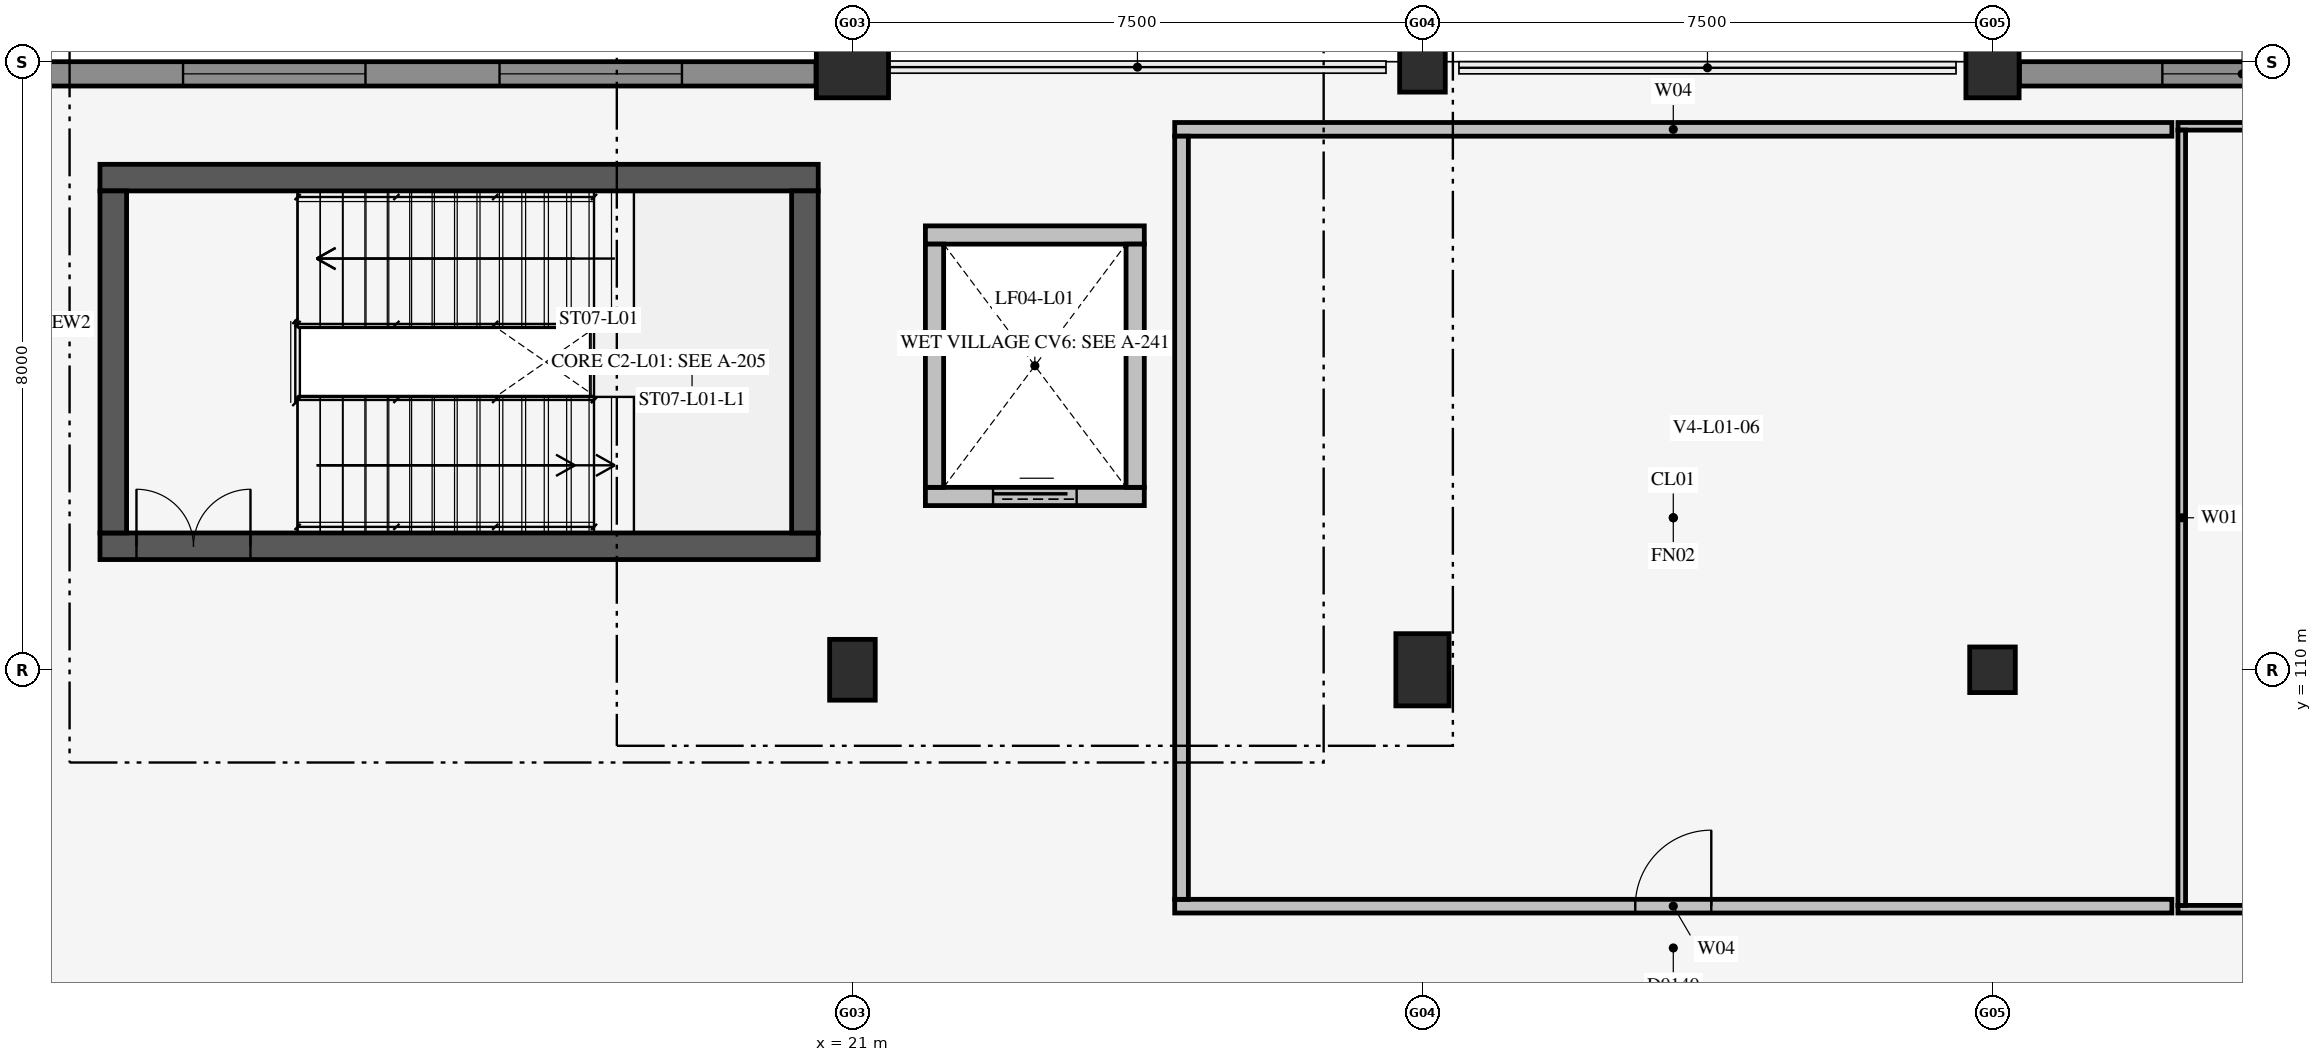
"""IFC4 building model, lengths in metres.
Left out: names, types, materials, properties, quantities, classifications, styles, units other than length and angle.
Written with IfcOpenShell. Run it as: python <this file> out.ifc"""

import sys

from ifc_helpers import new_model, si_unit, direction, frame, frame_2d, origin, origin_2d, place, context, subcontext, project, spatial, rectangle, circle, extrude, element, fill, save


model = new_model("IFC4")
c1 = context("Model", 3, precision=1e-05, world=origin(), true_north=direction((0.0, 1.0)))
c2 = subcontext(c1, "Body", "Model", "MODEL_VIEW")
j1 = project(units=[si_unit("LENGTHUNIT", "METRE"), si_unit("PLANEANGLEUNIT", "RADIAN")], contexts=[c1])
p1 = place(None, origin())
s1 = spatial("IfcSite", under=j1, at=p1, CompositionType="ELEMENT")
p2 = place(p1, origin())
s2 = spatial("IfcBuilding", under=s1, at=p2, CompositionType="ELEMENT")
p3 = place(p2, frame((0.0, 0.0, 5.4)))
s3 = spatial("IfcBuildingStorey", under=s2, at=p3, CompositionType="ELEMENT", Elevation=5.4)
p4 = place(p3, frame((11.1, 111.625, 0.0), z_axis=(0.0, 0.0, 1.0), x_axis=(1.0, 0.0, 0.0)))
e1 = element("IfcWall", 1, at=p4, inside=s3, PredefinedType="SHEAR", context=c2, shape_type="SweptSolid", body=[
    extrude(rectangle(XDim=9.45, YDim=0.35, at=frame_2d((4.725, 0.0))), origin(), (0.0, 0.0, 1.0), 4.58),
])
p5 = place(p4, frame((0.48, 0.0, 0.0)))
e2 = element("IfcOpeningElement", 2, at=p5, cuts=e1, PredefinedType="OPENING", context=c2, shape_type="SweptSolid", body=[
    extrude(rectangle(XDim=1.5, YDim=2.3, at=frame_2d((0.75, 1.15))), frame((0.0, 0.187, 0.0), z_axis=(0.0, -1.0, 0.0), x_axis=(1.0, 0.0, 0.0)), (0.0, 0.0, 1.0), 0.374),
])
p6 = place(p3, frame((11.1, 116.475, 0.0), z_axis=(0.0, 0.0, 1.0), x_axis=(1.0, 0.0, 0.0)))
e3 = element("IfcWall", 3, at=p6, inside=s3, PredefinedType="SHEAR", context=c2, shape_type="SweptSolid", body=[
    extrude(rectangle(XDim=9.45, YDim=0.35, at=frame_2d((4.725, 0.0))), origin(), (0.0, 0.0, 1.0), 4.58),
])
for number, where, z_axis, x_axis in (
    (4, (11.275, 111.8, 0.0), (0.0, 0.0, 1.0), (0.0, 1.0, 0.0)),
    (5, (20.375, 111.8, 0.0), (0.0, 0.0, 1.0), (0.0, 1.0, 0.0)),
):
    element("IfcWall", number, at=place(p3, frame(where, z_axis=z_axis, x_axis=x_axis)), inside=s3, PredefinedType="SHEAR", context=c2, shape_type="SweptSolid", body=[
        extrude(rectangle(XDim=4.5, YDim=0.35, at=frame_2d((2.25, 0.0))), origin(), (0.0, 0.0, 1.0), 4.58),
    ])
p7 = place(p3, frame((21.96, 112.28, 0.0), z_axis=(0.0, 0.0, 1.0), x_axis=(1.0, 0.0, 0.0)))
e6 = element("IfcWall", 6, at=p7, inside=s3, PredefinedType="SOLIDWALL", context=c2, shape_type="SweptSolid", body=[
    extrude(rectangle(XDim=2.88, YDim=0.24, at=frame_2d((1.44, 0.0))), origin(), (0.0, 0.0, 1.0), 4.8),
])
p8 = place(p7, frame((0.89, 0.0, 0.0)))
e7 = element("IfcOpeningElement", 7, at=p8, cuts=e6, PredefinedType="OPENING", context=c2, shape_type="SweptSolid", body=[
    extrude(rectangle(XDim=1.1, YDim=2.15, at=frame_2d((0.55, 1.075))), frame((0.0, 0.132, 0.0), z_axis=(0.0, -1.0, 0.0), x_axis=(1.0, 0.0, 0.0)), (0.0, 0.0, 1.0), 0.264),
])
p9 = place(p3, frame((21.96, 115.72, 0.0), z_axis=(0.0, 0.0, 1.0), x_axis=(1.0, 0.0, 0.0)))
e8 = element("IfcWall", 8, at=p9, inside=s3, PredefinedType="SOLIDWALL", context=c2, shape_type="SweptSolid", body=[
    extrude(rectangle(XDim=2.88, YDim=0.24, at=frame_2d((1.44, 0.0))), origin(), (0.0, 0.0, 1.0), 4.8),
])
for number, where, z_axis, x_axis in (
    (9, (22.08, 112.4, 0.0), (0.0, 0.0, 1.0), (0.0, 1.0, 0.0)),
    (10, (24.72, 112.4, 0.0), (0.0, 0.0, 1.0), (0.0, 1.0, 0.0)),
):
    element("IfcWall", number, at=place(p3, frame(where, z_axis=z_axis, x_axis=x_axis)), inside=s3, PredefinedType="SOLIDWALL", context=c2, shape_type="SweptSolid", body=[
        extrude(rectangle(XDim=3.2, YDim=0.24, at=frame_2d((1.6, 0.0))), origin(), (0.0, 0.0, 1.0), 4.8),
    ])
p10 = place(p3, frame((21.0, 110.0, 0.0), z_axis=(0.0, 0.0, 1.0), x_axis=(1.0, 0.0, 0.0)))
e11 = element("IfcColumn", 11, at=p10, inside=s3, PredefinedType="COLUMN", context=c2, shape_type="SweptSolid", body=[
    extrude(rectangle(XDim=0.6, YDim=0.8, at=origin_2d()), origin(), (0.0, 0.0, 1.0), 4.8),
])
p11 = place(p3, frame((21.0, 118.0, 0.0), z_axis=(0.0, 0.0, 1.0), x_axis=(1.0, 0.0, 0.0)))
e12 = element("IfcColumn", 12, at=p11, inside=s3, PredefinedType="COLUMN", context=c2, shape_type="SweptSolid", body=[
    extrude(rectangle(XDim=0.95, YDim=0.95, at=origin_2d()), origin(), (0.0, 0.0, 1.0), 4.8),
])
p12 = place(p3, frame((28.5, 110.0, 0.0), z_axis=(0.0, 0.0, 1.0), x_axis=(1.0, 0.0, 0.0)))
e13 = element("IfcColumn", 13, at=p12, inside=s3, PredefinedType="COLUMN", context=c2, shape_type="SweptSolid", body=[
    extrude(rectangle(XDim=0.7, YDim=0.95, at=origin_2d()), origin(), (0.0, 0.0, 1.0), 4.8),
])
p13 = place(p3, frame((28.5, 118.0, 0.0), z_axis=(0.0, 0.0, 1.0), x_axis=(1.0, 0.0, 0.0)))
e14 = element("IfcColumn", 14, at=p13, inside=s3, PredefinedType="COLUMN", context=c2, shape_type="SweptSolid", body=[
    extrude(rectangle(XDim=0.6, YDim=0.8, at=origin_2d()), origin(), (0.0, 0.0, 1.0), 4.8),
])
p14 = place(p3, frame((36.0, 110.0, 0.0), z_axis=(0.0, 0.0, 1.0), x_axis=(1.0, 0.0, 0.0)))
e15 = element("IfcColumn", 15, at=p14, inside=s3, PredefinedType="COLUMN", context=c2, shape_type="SweptSolid", body=[
    extrude(circle(Radius=0.3, at=origin_2d()), origin(), (0.0, 0.0, 1.0), 4.8),
])
p15 = place(p3, frame((36.0, 118.0, 0.0), z_axis=(0.0, 0.0, 1.0), x_axis=(1.0, 0.0, 0.0)))
e16 = element("IfcColumn", 16, at=p15, inside=s3, PredefinedType="COLUMN", context=c2, shape_type="SweptSolid", body=[
    extrude(rectangle(XDim=0.7, YDim=0.95, at=origin_2d()), origin(), (0.0, 0.0, 1.0), 4.8),
])
p16 = place(p3, frame((25.24, 106.89, 0.0), z_axis=(0.0, 0.0, 1.0), x_axis=(1.0, 0.0, 0.0)))
e17 = element("IfcWall", 17, at=p16, inside=s3, PredefinedType="PARTITIONING", context=c2, shape_type="SweptSolid", body=[
    extrude(rectangle(XDim=13.12, YDim=0.18, at=frame_2d((6.56, 0.0))), origin(), (0.0, 0.0, 1.0), 4.565),
])
p17 = place(p16, frame((6.06, 0.0, 0.0)))
e18 = element("IfcOpeningElement", 18, at=p17, cuts=e17, PredefinedType="OPENING", context=c2, shape_type="SweptSolid", body=[
    extrude(rectangle(XDim=1.0, YDim=2.2, at=frame_2d((0.5, 1.1))), frame((0.0, 0.102, 0.0), z_axis=(0.0, -1.0, 0.0), x_axis=(1.0, 0.0, 0.0)), (0.0, 0.0, 1.0), 0.204),
])
p18 = place(p3, frame((25.24, 117.11, 0.0), z_axis=(0.0, 0.0, 1.0), x_axis=(1.0, 0.0, 0.0)))
e19 = element("IfcWall", 19, at=p18, inside=s3, PredefinedType="PARTITIONING", context=c2, shape_type="SweptSolid", body=[
    extrude(rectangle(XDim=13.12, YDim=0.18, at=frame_2d((6.56, 0.0))), origin(), (0.0, 0.0, 1.0), 4.565),
])
p19 = place(p3, frame((25.33, 106.98, 0.0), z_axis=(0.0, 0.0, 1.0), x_axis=(0.0, 1.0, 0.0)))
e20 = element("IfcWall", 20, at=p19, inside=s3, PredefinedType="PARTITIONING", context=c2, shape_type="SweptSolid", body=[
    extrude(rectangle(XDim=10.04, YDim=0.18, at=frame_2d((5.02, 0.0))), origin(), (0.0, 0.0, 1.0), 4.565),
])
p20 = place(p3, frame((38.44, 106.85, 0.0), z_axis=(0.0, 0.0, 1.0), x_axis=(1.0, 0.0, 0.0)))
e21 = element("IfcWall", 21, at=p20, inside=s3, PredefinedType="PARTITIONING", context=c2, shape_type="SweptSolid", body=[
    extrude(rectangle(XDim=13.12, YDim=0.1, at=frame_2d((6.56, 0.0))), origin(), (0.0, 0.0, 1.0), 4.565),
])
p21 = place(p20, frame((3.317, 0.0, 0.0)))
e22 = element("IfcOpeningElement", 22, at=p21, cuts=e21, PredefinedType="OPENING", context=c2, shape_type="SweptSolid", body=[
    extrude(rectangle(XDim=0.95, YDim=2.15, at=frame_2d((0.475, 1.075))), frame((0.0, 0.062, 0.0), z_axis=(0.0, -1.0, 0.0), x_axis=(1.0, 0.0, 0.0)), (0.0, 0.0, 1.0), 0.124),
])
p22 = place(p3, frame((38.44, 117.15, 0.0), z_axis=(0.0, 0.0, 1.0), x_axis=(1.0, 0.0, 0.0)))
e23 = element("IfcWall", 23, at=p22, inside=s3, PredefinedType="PARTITIONING", context=c2, shape_type="SweptSolid", body=[
    extrude(rectangle(XDim=13.12, YDim=0.1, at=frame_2d((6.56, 0.0))), origin(), (0.0, 0.0, 1.0), 4.565),
])
p23 = place(p3, frame((38.49, 106.9, 0.0), z_axis=(0.0, 0.0, 1.0), x_axis=(0.0, 1.0, 0.0)))
e24 = element("IfcWall", 24, at=p23, inside=s3, PredefinedType="PARTITIONING", context=c2, shape_type="SweptSolid", body=[
    extrude(rectangle(XDim=10.2, YDim=0.1, at=frame_2d((5.1, 0.0))), origin(), (0.0, 0.0, 1.0), 4.565),
])
p24 = place(p3, frame((10.429, 117.84, 0.0), z_axis=(0.0, 0.0, 1.0), x_axis=(1.0, 0.0, 0.0)))
e25 = element("IfcWall", 25, at=p24, inside=s3, PredefinedType="SOLIDWALL", context=c2, shape_type="SweptSolid", body=[
    extrude(rectangle(XDim=10.092, YDim=0.32, at=frame_2d((5.046, 0.0))), origin(), (0.0, 0.0, 1.0), 4.09),
])
p25 = place(p24, frame((1.764, 0.0, 0.95)))
e26 = element("IfcOpeningElement", 26, at=p25, cuts=e25, PredefinedType="OPENING", context=c2, shape_type="SweptSolid", body=[
    extrude(rectangle(XDim=2.4, YDim=1.2, at=frame_2d((1.2, 0.6))), frame((0.0, 0.172, 0.0), z_axis=(0.0, -1.0, 0.0), x_axis=(1.0, 0.0, 0.0)), (0.0, 0.0, 1.0), 0.344),
])
p26 = place(p24, frame((5.928, 0.0, 0.95)))
e27 = element("IfcOpeningElement", 27, at=p26, cuts=e25, PredefinedType="OPENING", context=c2, shape_type="SweptSolid", body=[
    extrude(rectangle(XDim=2.4, YDim=1.2, at=frame_2d((1.2, 0.6))), frame((0.0, 0.172, 0.0), z_axis=(0.0, -1.0, 0.0), x_axis=(1.0, 0.0, 0.0)), (0.0, 0.0, 1.0), 0.344),
])
p27 = place(p3, frame((36.354, 117.84, 0.0), z_axis=(0.0, 0.0, 1.0), x_axis=(1.0, 0.0, 0.0)))
e28 = element("IfcWall", 28, at=p27, inside=s3, PredefinedType="SOLIDWALL", context=c2, shape_type="SweptSolid", body=[
    extrude(rectangle(XDim=9.842, YDim=0.32, at=frame_2d((4.921, 0.0))), origin(), (0.0, 0.0, 1.0), 4.137),
])
p28 = place(p27, frame((1.881, 0.0, 0.95)))
e29 = element("IfcOpeningElement", 29, at=p28, cuts=e28, PredefinedType="OPENING", context=c2, shape_type="SweptSolid", body=[
    extrude(rectangle(XDim=2.1, YDim=1.5, at=frame_2d((1.05, 0.75))), frame((0.0, 0.172, 0.0), z_axis=(0.0, -1.0, 0.0), x_axis=(1.0, 0.0, 0.0)), (0.0, 0.0, 1.0), 0.344),
])
p29 = place(p27, frame((5.861, 0.0, 0.95)))
e30 = element("IfcOpeningElement", 30, at=p29, cuts=e28, PredefinedType="OPENING", context=c2, shape_type="SweptSolid", body=[
    extrude(rectangle(XDim=2.1, YDim=1.5, at=frame_2d((1.05, 0.75))), frame((0.0, 0.172, 0.0), z_axis=(0.0, -1.0, 0.0), x_axis=(1.0, 0.0, 0.0)), (0.0, 0.0, 1.0), 0.344),
])
p30 = place(p5, origin())
e31 = element("IfcDoor", 31, at=p30, inside=s3, OperationType="DOUBLE_DOOR_SINGLE_SWING", PredefinedType="DOOR", context=c2, shape_type="SweptSolid", body=[
    extrude(rectangle(XDim=1.5, YDim=2.3, at=frame_2d((0.75, 1.15))), frame((0.0, 0.025, 0.0), z_axis=(0.0, -1.0, 0.0), x_axis=(1.0, 0.0, 0.0)), (0.0, 0.0, 1.0), 0.05),
])
fill(e2, e31)
p31 = place(p17, origin())
e32 = element("IfcDoor", 32, at=p31, inside=s3, OperationType="SINGLE_SWING_RIGHT", PredefinedType="DOOR", context=c2, shape_type="SweptSolid", body=[
    extrude(rectangle(XDim=1.0, YDim=2.2, at=frame_2d((0.5, 1.1))), frame((0.0, 0.025, 0.0), z_axis=(0.0, -1.0, 0.0), x_axis=(1.0, 0.0, 0.0)), (0.0, 0.0, 1.0), 0.05),
])
fill(e18, e32)
p32 = place(p25, origin())
e33 = element("IfcWindow", 33, at=p32, inside=s3, PartitioningType="SINGLE_PANEL", PredefinedType="WINDOW", context=c2, shape_type="SweptSolid", body=[
    extrude(rectangle(XDim=2.4, YDim=1.2, at=frame_2d((1.2, 0.6))), frame((0.0, 0.03, 0.0), z_axis=(0.0, -1.0, 0.0), x_axis=(1.0, 0.0, 0.0)), (0.0, 0.0, 1.0), 0.06),
])
fill(e26, e33)
p33 = place(p26, origin())
e34 = element("IfcWindow", 34, at=p33, inside=s3, PartitioningType="SINGLE_PANEL", PredefinedType="WINDOW", context=c2, shape_type="SweptSolid", body=[
    extrude(rectangle(XDim=2.4, YDim=1.2, at=frame_2d((1.2, 0.6))), frame((0.0, 0.03, 0.0), z_axis=(0.0, -1.0, 0.0), x_axis=(1.0, 0.0, 0.0)), (0.0, 0.0, 1.0), 0.06),
])
fill(e27, e34)
p34 = place(p28, origin())
e35 = element("IfcWindow", 35, at=p34, inside=s3, PartitioningType="SINGLE_PANEL", PredefinedType="WINDOW", context=c2, shape_type="SweptSolid", body=[
    extrude(rectangle(XDim=2.1, YDim=1.5, at=frame_2d((1.05, 0.75))), frame((0.0, 0.03, 0.0), z_axis=(0.0, -1.0, 0.0), x_axis=(1.0, 0.0, 0.0)), (0.0, 0.0, 1.0), 0.06),
])
fill(e29, e35)
p35 = place(p8, origin())
e36 = element("IfcDoor", 36, at=p35, inside=s3, OperationType="SLIDING_TO_LEFT", PredefinedType="USERDEFINED", context=c2, shape_type="SweptSolid", body=[
    extrude(rectangle(XDim=1.1, YDim=2.15, at=frame_2d((0.55, 1.075))), frame((0.0, 0.025, 0.0), z_axis=(0.0, -1.0, 0.0), x_axis=(1.0, 0.0, 0.0)), (0.0, 0.0, 1.0), 0.05),
])
fill(e7, e36)
save(model, sys.argv[1])
